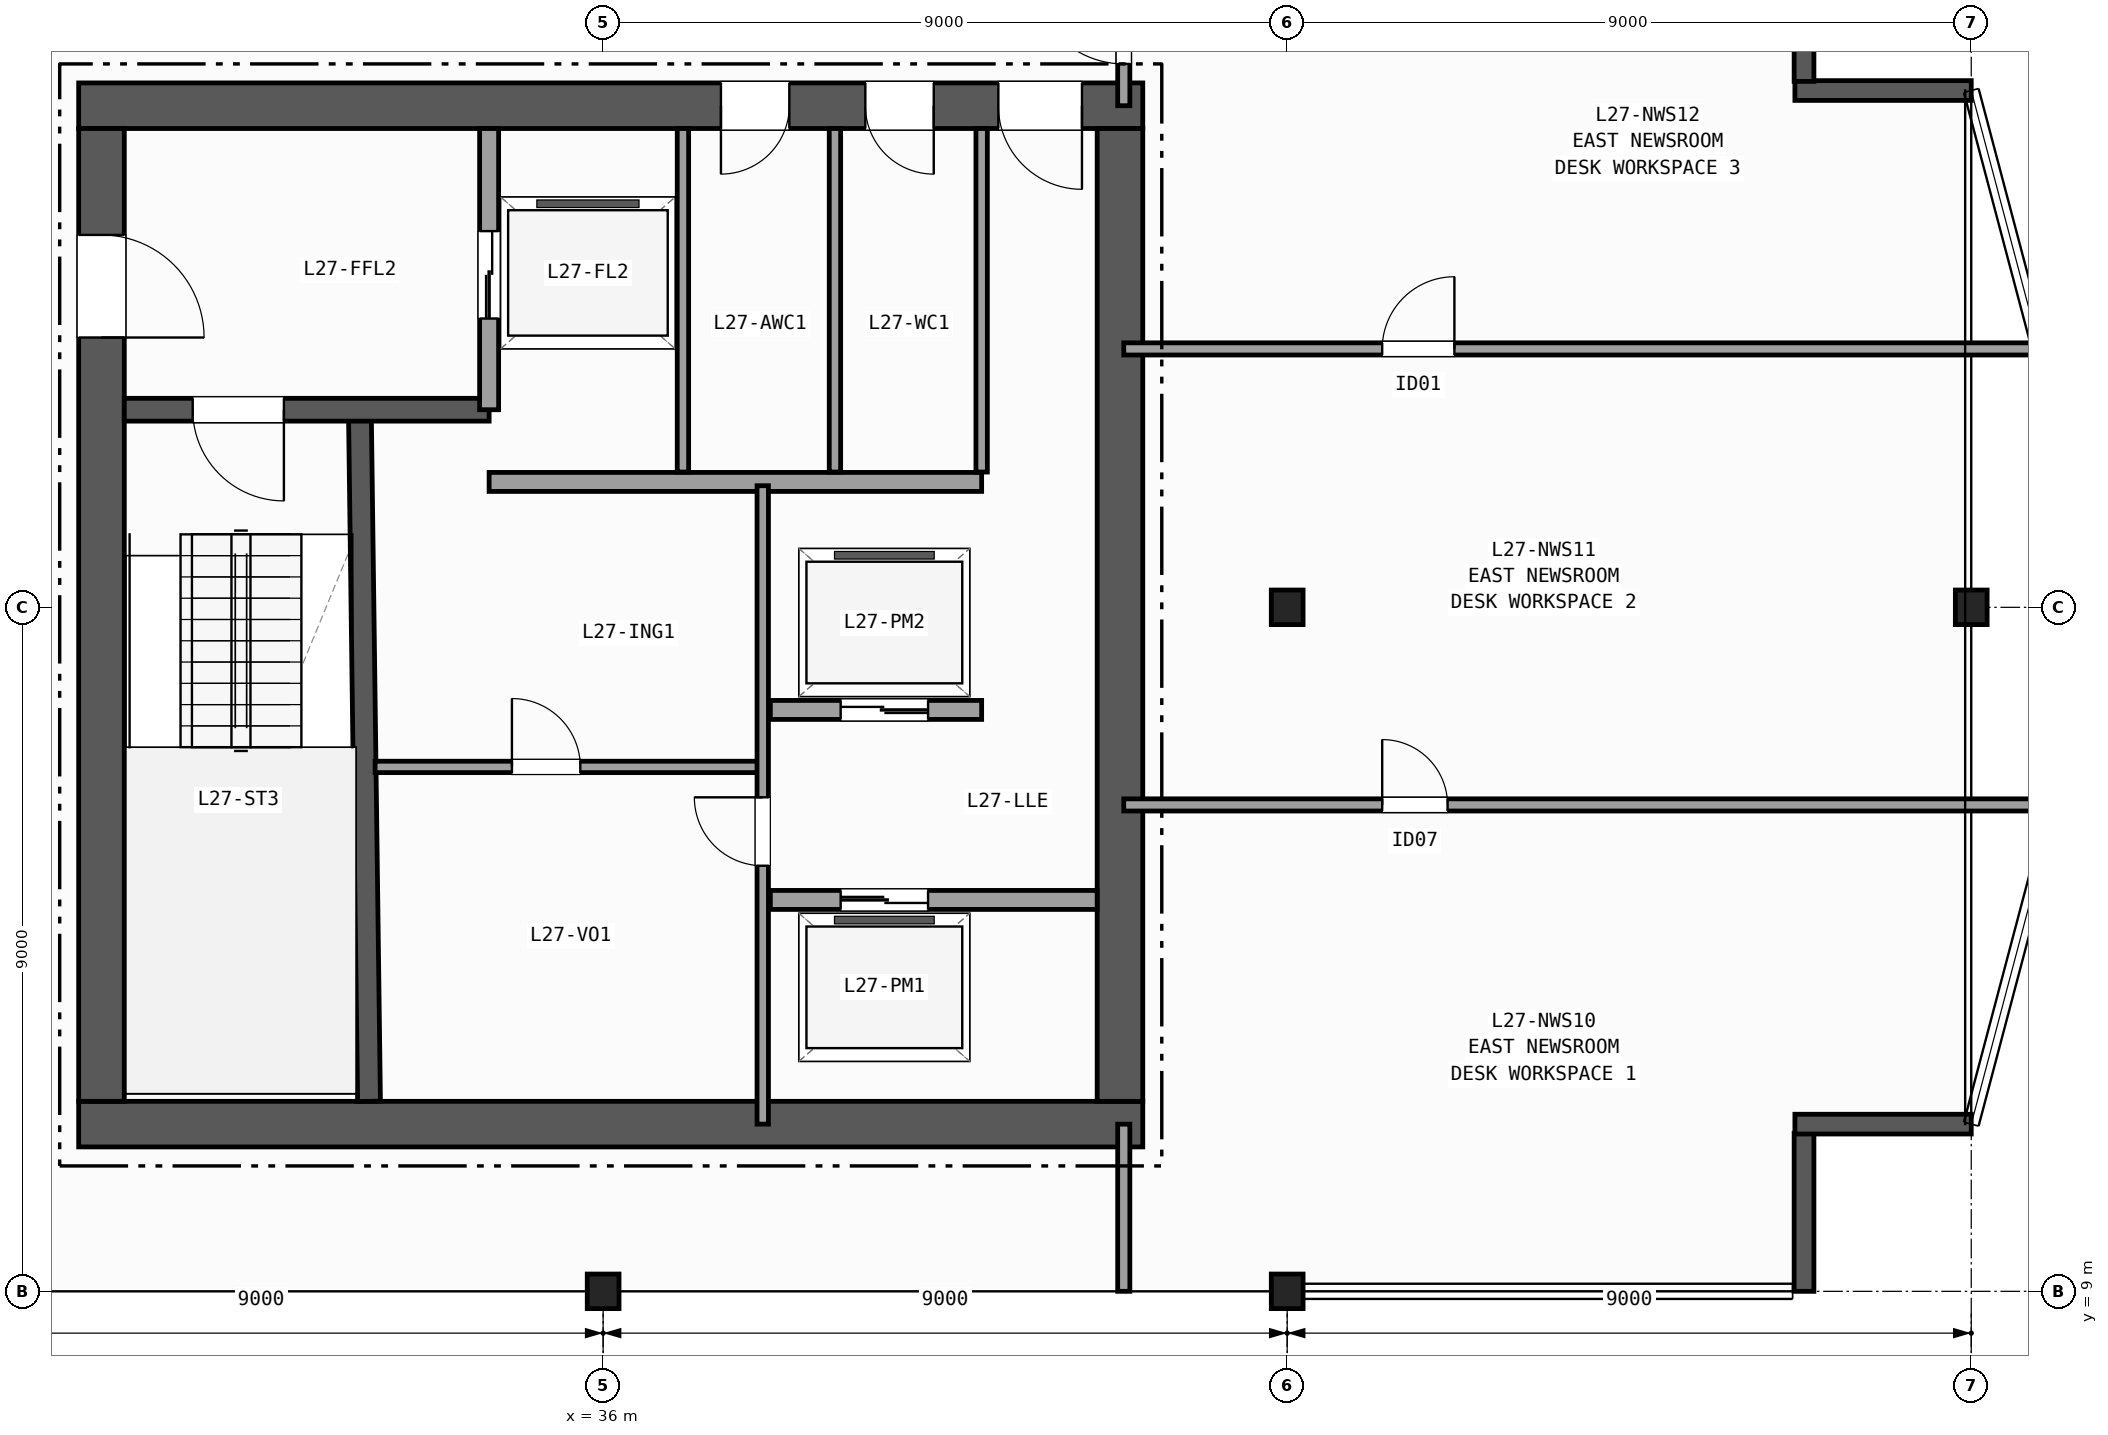
"""IFC4 building model, lengths in metres.
Left out: names, types, materials, properties, quantities, classifications, styles, units other than length and angle.
Written with IfcOpenShell. Run it as: python <this file> out.ifc"""

import sys

from ifc_helpers import new_model, si_unit, direction, frame, frame_2d, origin, origin_2d, place, context, subcontext, project, spatial, rectangle, i_section, extrude, element, fill, save


model = new_model("IFC4")
c1 = context("Model", 3, precision=1e-05, world=origin(), true_north=direction((0.0, 1.0)))
c2 = subcontext(c1, "Body", "Model", "MODEL_VIEW")
j1 = project(units=[si_unit("LENGTHUNIT", "METRE"), si_unit("PLANEANGLEUNIT", "RADIAN")], contexts=[c1])
p1 = place(None, origin())
s1 = spatial("IfcSite", under=j1, at=p1, CompositionType="ELEMENT")
p2 = place(p1, origin())
s2 = spatial("IfcBuilding", under=s1, at=p2, CompositionType="ELEMENT")
p3 = place(p2, frame((0.0, 0.0, 113.7)))
s3 = spatial("IfcBuildingStorey", under=s2, at=p3, CompositionType="ELEMENT", Elevation=113.7)
for number, where, z_axis, x_axis in (
    (1, (36.0, 9.0, 0.0), (0.0, 0.0, 1.0), (1.0, 0.0, 0.0)),
    (2, (45.0, 9.0, 0.0), (0.0, 0.0, 1.0), (1.0, 0.0, 0.0)),
    (3, (45.0, 18.0, 0.0), (0.0, 0.0, 1.0), (1.0, 0.0, 0.0)),
    (4, (54.0, 18.0, 0.0), (0.0, 0.0, 1.0), (1.0, 0.0, 0.0)),
):
    element("IfcColumn", number, at=place(p3, frame(where, z_axis=z_axis, x_axis=x_axis)), inside=s3, PredefinedType="COLUMN", context=c2, shape_type="SweptSolid", body=[
        extrude(i_section(OverallWidth=0.418, OverallDepth=0.455, WebThickness=0.042, FlangeThickness=0.068, FilletRadius=0.015, at=origin_2d()), origin(), (0.0, 0.0, 1.0), 3.7),
    ])
p4 = place(p3, frame((51.8, 9.0, 0.0), z_axis=(0.0, 0.0, 1.0), x_axis=(0.0, 1.0, 0.0)))
e5 = element("IfcWall", 5, at=p4, inside=s3, PredefinedType="SOLIDWALL", context=c2, shape_type="SweptSolid", body=[
    extrude(rectangle(XDim=2.08, YDim=0.26, at=frame_2d((1.04, 0.0))), origin(), (0.0, 0.0, 1.0), 3.42),
])
for number, where, z_axis, x_axis in (
    (6, (51.68, 11.2, 0.0), (0.0, 0.0, 1.0), (1.0, 0.0, 0.0)),
    (7, (54.0, 24.8, 0.0), (0.0, 0.0, 1.0), (-1.0, 0.0, 0.0)),
):
    element("IfcWall", number, at=place(p3, frame(where, z_axis=z_axis, x_axis=x_axis)), inside=s3, PredefinedType="SOLIDWALL", context=c2, shape_type="SweptSolid", body=[
        extrude(rectangle(XDim=2.32, YDim=0.26, at=frame_2d((1.16, 0.0))), origin(), (0.0, 0.0, 1.0), 3.42),
    ])
p5 = place(p3, frame((51.8, 24.92, 0.0), z_axis=(0.0, 0.0, 1.0), x_axis=(0.0, 1.0, 0.0)))
e8 = element("IfcWall", 8, at=p5, inside=s3, PredefinedType="SOLIDWALL", context=c2, shape_type="SweptSolid", body=[
    extrude(rectangle(XDim=2.08, YDim=0.26, at=frame_2d((1.04, 0.0))), origin(), (0.0, 0.0, 1.0), 3.42),
])
p6 = place(p3, frame((29.1, 11.2, 0.0), z_axis=(0.0, 0.0, 1.0), x_axis=(1.0, 0.0, 0.0)))
e9 = element("IfcWall", 9, at=p6, inside=s3, PredefinedType="SHEAR", context=c2, shape_type="SweptSolid", body=[
    extrude(rectangle(XDim=14.0, YDim=0.6, at=frame_2d((7.0, 0.0))), origin(), (0.0, 0.0, 1.0), 3.42),
])
p7 = place(p3, frame((43.1, 24.6, 0.0), z_axis=(0.0, 0.0, 1.0), x_axis=(-1.0, 0.0, 0.0)))
e10 = element("IfcWall", 10, at=p7, inside=s3, PredefinedType="SHEAR", context=c2, shape_type="SweptSolid", body=[
    extrude(rectangle(XDim=14.0, YDim=0.6, at=frame_2d((7.0, 0.0))), origin(), (0.0, 0.0, 1.0), 3.42),
])
p8 = place(p7, frame((0.8, 0.0, 0.0)))
e11 = element("IfcOpeningElement", 11, at=p8, cuts=e10, PredefinedType="OPENING", context=c2, shape_type="SweptSolid", body=[
    extrude(rectangle(XDim=1.1, YDim=2.15, at=frame_2d((0.55, 1.075))), frame((0.0, 0.31, 0.0), z_axis=(0.0, -1.0, 0.0), x_axis=(1.0, 0.0, 0.0)), (0.0, 0.0, 1.0), 0.62),
])
p9 = place(p7, frame((2.75, 0.0, 0.0)))
e12 = element("IfcOpeningElement", 12, at=p9, cuts=e10, PredefinedType="OPENING", context=c2, shape_type="SweptSolid", body=[
    extrude(rectangle(XDim=0.9, YDim=2.1, at=frame_2d((0.45, 1.05))), frame((0.0, 0.31, 0.0), z_axis=(0.0, -1.0, 0.0), x_axis=(1.0, 0.0, 0.0)), (0.0, 0.0, 1.0), 0.62),
])
p10 = place(p7, frame((4.65, 0.0, 0.0)))
e13 = element("IfcOpeningElement", 13, at=p10, cuts=e10, PredefinedType="OPENING", context=c2, shape_type="SweptSolid", body=[
    extrude(rectangle(XDim=0.9, YDim=2.1, at=frame_2d((0.45, 1.05))), frame((0.0, 0.31, 0.0), z_axis=(0.0, -1.0, 0.0), x_axis=(1.0, 0.0, 0.0)), (0.0, 0.0, 1.0), 0.62),
])
p11 = place(p3, frame((29.4, 24.3, 0.0), z_axis=(0.0, 0.0, 1.0), x_axis=(0.0, -1.0, 0.0)))
e14 = element("IfcWall", 14, at=p11, inside=s3, PredefinedType="SHEAR", context=c2, shape_type="SweptSolid", body=[
    extrude(rectangle(XDim=12.8, YDim=0.6, at=frame_2d((6.4, 0.0))), origin(), (0.0, 0.0, 1.0), 3.42),
])
p12 = place(p11, frame((1.4, 0.0, 0.0)))
e15 = element("IfcOpeningElement", 15, at=p12, cuts=e14, PredefinedType="OPENING", context=c2, shape_type="SweptSolid", body=[
    extrude(rectangle(XDim=1.35, YDim=2.15, at=frame_2d((0.675, 1.075))), frame((0.0, 0.31, 0.0), z_axis=(0.0, -1.0, 0.0), x_axis=(1.0, 0.0, 0.0)), (0.0, 0.0, 1.0), 0.62),
])
p13 = place(p3, frame((42.8, 11.5, 0.0), z_axis=(0.0, 0.0, 1.0), x_axis=(0.0, 1.0, 0.0)))
e16 = element("IfcWall", 16, at=p13, inside=s3, PredefinedType="SHEAR", context=c2, shape_type="SweptSolid", body=[
    extrude(rectangle(XDim=12.8, YDim=0.6, at=frame_2d((6.4, 0.0))), origin(), (0.0, 0.0, 1.0), 3.42),
])
p14 = place(p3, frame((32.92, 11.5, 0.0), z_axis=(0.0, 0.0, 1.0), x_axis=(-0.013244407292, 0.999912288991, 0.0)))
e17 = element("IfcWall", 17, at=p14, inside=s3, PredefinedType="SHEAR", context=c2, shape_type="SweptSolid", body=[
    extrude(rectangle(XDim=9.051, YDim=0.3, at=frame_2d((4.525, 0.0))), origin(), (0.0, 0.0, 1.0), 3.42),
])
p15 = place(p3, frame((34.5, 20.6, 0.0), z_axis=(0.0, 0.0, 1.0), x_axis=(-1.0, 0.0, 0.0)))
e18 = element("IfcWall", 18, at=p15, inside=s3, PredefinedType="SHEAR", context=c2, shape_type="SweptSolid", body=[
    extrude(rectangle(XDim=4.8, YDim=0.3, at=frame_2d((2.4, 0.0))), origin(), (0.0, 0.0, 1.0), 3.42),
])
p16 = place(p15, frame((2.7, 0.0, 0.0)))
e19 = element("IfcOpeningElement", 19, at=p16, cuts=e18, PredefinedType="OPENING", context=c2, shape_type="SweptSolid", body=[
    extrude(rectangle(XDim=1.2, YDim=2.15, at=frame_2d((0.6, 1.075))), frame((0.0, 0.16, 0.0), z_axis=(0.0, -1.0, 0.0), x_axis=(1.0, 0.0, 0.0)), (0.0, 0.0, 1.0), 0.32),
])
p17 = place(p3, frame((34.5, 20.6, 0.0), z_axis=(0.0, 0.0, 1.0), x_axis=(0.0, 1.0, 0.0)))
e20 = element("IfcWall", 20, at=p17, inside=s3, PredefinedType="PARTITIONING", context=c2, shape_type="SweptSolid", body=[
    extrude(rectangle(XDim=3.7, YDim=0.25, at=frame_2d((1.85, 0.0))), origin(), (0.0, 0.0, 1.0), 3.42),
])
p18 = place(p17, frame((1.2, 0.0, 0.0)))
e21 = element("IfcOpeningElement", 21, at=p18, cuts=e20, PredefinedType="OPENING", context=c2, shape_type="SweptSolid", body=[
    extrude(rectangle(XDim=1.15, YDim=2.15, at=frame_2d((0.575, 1.075))), frame((0.0, 0.135, 0.0), z_axis=(0.0, -1.0, 0.0), x_axis=(1.0, 0.0, 0.0)), (0.0, 0.0, 1.0), 0.27),
])
p19 = place(p3, frame((34.5, 19.65, 0.0), z_axis=(0.0, 0.0, 1.0), x_axis=(1.0, 0.0, 0.0)))
e22 = element("IfcWall", 22, at=p19, inside=s3, PredefinedType="PARTITIONING", context=c2, shape_type="SweptSolid", body=[
    extrude(rectangle(XDim=6.48, YDim=0.25, at=frame_2d((3.24, 0.0))), origin(), (0.0, 0.0, 1.0), 3.42),
])
p20 = place(p3, frame((38.2, 14.15, 0.0), z_axis=(0.0, 0.0, 1.0), x_axis=(1.0, 0.0, 0.0)))
e23 = element("IfcWall", 23, at=p20, inside=s3, PredefinedType="PARTITIONING", context=c2, shape_type="SweptSolid", body=[
    extrude(rectangle(XDim=4.3, YDim=0.25, at=frame_2d((2.15, 0.0))), origin(), (0.0, 0.0, 1.0), 3.42),
])
p21 = place(p20, frame((0.925, 0.0, 0.0)))
e24 = element("IfcOpeningElement", 24, at=p21, cuts=e23, PredefinedType="OPENING", context=c2, shape_type="SweptSolid", body=[
    extrude(rectangle(XDim=1.15, YDim=2.15, at=frame_2d((0.575, 1.075))), frame((0.0, 0.135, 0.0), z_axis=(0.0, -1.0, 0.0), x_axis=(1.0, 0.0, 0.0)), (0.0, 0.0, 1.0), 0.27),
])
p22 = place(p3, frame((40.98, 16.65, 0.0), z_axis=(0.0, 0.0, 1.0), x_axis=(-1.0, 0.0, 0.0)))
e25 = element("IfcWall", 25, at=p22, inside=s3, PredefinedType="PARTITIONING", context=c2, shape_type="SweptSolid", body=[
    extrude(rectangle(XDim=2.78, YDim=0.25, at=frame_2d((1.39, 0.0))), origin(), (0.0, 0.0, 1.0), 3.42),
])
p23 = place(p22, frame((0.705, 0.0, 0.0)))
e26 = element("IfcOpeningElement", 26, at=p23, cuts=e25, PredefinedType="OPENING", context=c2, shape_type="SweptSolid", body=[
    extrude(rectangle(XDim=1.15, YDim=2.15, at=frame_2d((0.575, 1.075))), frame((0.0, 0.135, 0.0), z_axis=(0.0, -1.0, 0.0), x_axis=(1.0, 0.0, 0.0)), (0.0, 0.0, 1.0), 0.27),
])
p24 = place(p3, frame((33.0, 15.9, 0.0), z_axis=(0.0, 0.0, 1.0), x_axis=(1.0, 0.0, 0.0)))
e27 = element("IfcWall", 27, at=p24, inside=s3, PredefinedType="PARTITIONING", context=c2, shape_type="SweptSolid", body=[
    extrude(rectangle(XDim=5.1, YDim=0.15, at=frame_2d((2.55, 0.0))), origin(), (0.0, 0.0, 1.0), 3.42),
])
p25 = place(p24, frame((1.8, 0.0, 0.0)))
e28 = element("IfcOpeningElement", 28, at=p25, cuts=e27, PredefinedType="OPENING", context=c2, shape_type="SweptSolid", body=[
    extrude(rectangle(XDim=0.9, YDim=2.1, at=frame_2d((0.45, 1.05))), frame((0.0, 0.085, 0.0), z_axis=(0.0, -1.0, 0.0), x_axis=(1.0, 0.0, 0.0)), (0.0, 0.0, 1.0), 0.17),
])
p26 = place(p3, frame((38.1, 11.2, 0.0), z_axis=(0.0, 0.0, 1.0), x_axis=(0.0, 1.0, 0.0)))
e29 = element("IfcWall", 29, at=p26, inside=s3, PredefinedType="PARTITIONING", context=c2, shape_type="SweptSolid", body=[
    extrude(rectangle(XDim=8.4, YDim=0.15, at=frame_2d((4.2, 0.0))), origin(), (0.0, 0.0, 1.0), 3.42),
])
p27 = place(p26, frame((3.4, 0.0, 0.0)))
e30 = element("IfcOpeningElement", 30, at=p27, cuts=e29, PredefinedType="OPENING", context=c2, shape_type="SweptSolid", body=[
    extrude(rectangle(XDim=0.9, YDim=2.1, at=frame_2d((0.45, 1.05))), frame((0.0, 0.085, 0.0), z_axis=(0.0, -1.0, 0.0), x_axis=(1.0, 0.0, 0.0)), (0.0, 0.0, 1.0), 0.17),
])
for number, where, z_axis, x_axis in (
    (31, (37.05, 19.78, 0.0), (0.0, 0.0, 1.0), (0.0, 1.0, 0.0)),
    (32, (39.05, 19.78, 0.0), (0.0, 0.0, 1.0), (0.0, 1.0, 0.0)),
    (33, (40.98, 19.78, 0.0), (0.0, 0.0, 1.0), (0.0, 1.0, 0.0)),
):
    element("IfcWall", number, at=place(p3, frame(where, z_axis=z_axis, x_axis=x_axis)), inside=s3, PredefinedType="PARTITIONING", context=c2, shape_type="SweptSolid", body=[
        extrude(rectangle(XDim=4.52, YDim=0.15, at=frame_2d((2.26, 0.0))), origin(), (0.0, 0.0, 1.0), 3.42),
    ])
p28 = place(p3, frame((42.85, 9.0, 0.0), z_axis=(0.0, 0.0, 1.0), x_axis=(0.0, 1.0, 0.0)))
e34 = element("IfcWall", 34, at=p28, inside=s3, PredefinedType="PARTITIONING", context=c2, shape_type="SweptSolid", body=[
    extrude(rectangle(XDim=2.2, YDim=0.16, at=frame_2d((1.1, 0.0))), origin(), (0.0, 0.0, 1.0), 2.634),
])
p29 = place(p3, frame((42.85, 24.6, 0.0), z_axis=(0.0, 0.0, 1.0), x_axis=(0.0, 1.0, 0.0)))
e35 = element("IfcWall", 35, at=p29, inside=s3, PredefinedType="PARTITIONING", context=c2, shape_type="SweptSolid", body=[
    extrude(rectangle(XDim=2.4, YDim=0.16, at=frame_2d((1.2, 0.0))), origin(), (0.0, 0.0, 1.0), 2.634),
])
p30 = place(p29, frame((0.55, 0.0, 0.0)))
e36 = element("IfcOpeningElement", 36, at=p30, cuts=e35, PredefinedType="OPENING", context=c2, shape_type="SweptSolid", body=[
    extrude(rectangle(XDim=1.2, YDim=2.15, at=frame_2d((0.6, 1.075))), frame((0.0, 0.09, 0.0), z_axis=(0.0, -1.0, 0.0), x_axis=(1.0, 0.0, 0.0)), (0.0, 0.0, 1.0), 0.18),
])
p31 = place(p3, frame((42.85, 15.4, 0.0), z_axis=(0.0, 0.0, 1.0), x_axis=(1.0, 0.0, 0.0)))
e37 = element("IfcWall", 37, at=p31, inside=s3, PredefinedType="PARTITIONING", context=c2, shape_type="SweptSolid", body=[
    extrude(rectangle(XDim=12.262, YDim=0.16, at=frame_2d((6.131, 0.0))), origin(), (0.0, 0.0, 1.0), 3.42),
])
p32 = place(p31, frame((3.4, 0.0, 0.0)))
e38 = element("IfcOpeningElement", 38, at=p32, cuts=e37, PredefinedType="OPENING", context=c2, shape_type="SweptSolid", body=[
    extrude(rectangle(XDim=0.86, YDim=2.05, at=frame_2d((0.43, 1.025))), frame((0.0, 0.09, 0.0), z_axis=(0.0, -1.0, 0.0), x_axis=(1.0, 0.0, 0.0)), (0.0, 0.0, 1.0), 0.18),
])
p33 = place(p3, frame((42.85, 21.4, 0.0), z_axis=(0.0, 0.0, 1.0), x_axis=(1.0, 0.0, 0.0)))
e39 = element("IfcWall", 39, at=p33, inside=s3, PredefinedType="PARTITIONING", context=c2, shape_type="SweptSolid", body=[
    extrude(rectangle(XDim=12.05, YDim=0.16, at=frame_2d((6.025, 0.0))), origin(), (0.0, 0.0, 1.0), 3.42),
])
p34 = place(p33, frame((3.4, 0.0, 0.0)))
e40 = element("IfcOpeningElement", 40, at=p34, cuts=e39, PredefinedType="OPENING", context=c2, shape_type="SweptSolid", body=[
    extrude(rectangle(XDim=0.95, YDim=2.1, at=frame_2d((0.475, 1.05))), frame((0.0, 0.09, 0.0), z_axis=(0.0, -1.0, 0.0), x_axis=(1.0, 0.0, 0.0)), (0.0, 0.0, 1.0), 0.18),
])
p35 = place(p16, origin())
e41 = element("IfcDoor", 41, at=p35, inside=s3, OperationType="SINGLE_SWING_LEFT", PredefinedType="DOOR", context=c2, shape_type="SweptSolid", body=[
    extrude(rectangle(XDim=1.2, YDim=2.15, at=frame_2d((0.6, 1.075))), frame((0.0, 0.025, 0.0), z_axis=(0.0, -1.0, 0.0), x_axis=(1.0, 0.0, 0.0)), (0.0, 0.0, 1.0), 0.05),
])
fill(e19, e41)
p36 = place(p12, origin())
e42 = element("IfcDoor", 42, at=p36, inside=s3, OperationType="SINGLE_SWING_RIGHT", PredefinedType="DOOR", context=c2, shape_type="SweptSolid", body=[
    extrude(rectangle(XDim=1.35, YDim=2.15, at=frame_2d((0.675, 1.075))), frame((0.0, 0.025, 0.0), z_axis=(0.0, -1.0, 0.0), x_axis=(1.0, 0.0, 0.0)), (0.0, 0.0, 1.0), 0.05),
])
fill(e15, e42)
p37 = place(p8, origin())
e43 = element("IfcDoor", 43, at=p37, inside=s3, OperationType="SINGLE_SWING_LEFT", PredefinedType="DOOR", context=c2, shape_type="SweptSolid", body=[
    extrude(rectangle(XDim=1.1, YDim=2.15, at=frame_2d((0.55, 1.075))), frame((0.0, 0.025, 0.0), z_axis=(0.0, -1.0, 0.0), x_axis=(1.0, 0.0, 0.0)), (0.0, 0.0, 1.0), 0.05),
])
fill(e11, e43)
p38 = place(p9, origin())
e44 = element("IfcDoor", 44, at=p38, inside=s3, OperationType="SINGLE_SWING_LEFT", PredefinedType="DOOR", context=c2, shape_type="SweptSolid", body=[
    extrude(rectangle(XDim=0.9, YDim=2.1, at=frame_2d((0.45, 1.05))), frame((0.0, 0.025, 0.0), z_axis=(0.0, -1.0, 0.0), x_axis=(1.0, 0.0, 0.0)), (0.0, 0.0, 1.0), 0.05),
])
fill(e12, e44)
p39 = place(p10, origin())
e45 = element("IfcDoor", 45, at=p39, inside=s3, OperationType="SINGLE_SWING_RIGHT", PredefinedType="DOOR", context=c2, shape_type="SweptSolid", body=[
    extrude(rectangle(XDim=0.9, YDim=2.1, at=frame_2d((0.45, 1.05))), frame((0.0, 0.025, 0.0), z_axis=(0.0, -1.0, 0.0), x_axis=(1.0, 0.0, 0.0)), (0.0, 0.0, 1.0), 0.05),
])
fill(e13, e45)
p40 = place(p18, origin())
e46 = element("IfcDoor", 46, at=p40, inside=s3, OperationType="DOUBLE_DOOR_SLIDING", PredefinedType="DOOR", context=c2, shape_type="SweptSolid", body=[
    extrude(rectangle(XDim=1.15, YDim=2.15, at=frame_2d((0.575, 1.075))), frame((0.0, 0.025, 0.0), z_axis=(0.0, -1.0, 0.0), x_axis=(1.0, 0.0, 0.0)), (0.0, 0.0, 1.0), 0.05),
])
fill(e21, e46)
p41 = place(p21, origin())
e47 = element("IfcDoor", 47, at=p41, inside=s3, OperationType="DOUBLE_DOOR_SLIDING", PredefinedType="DOOR", context=c2, shape_type="SweptSolid", body=[
    extrude(rectangle(XDim=1.15, YDim=2.15, at=frame_2d((0.575, 1.075))), frame((0.0, 0.025, 0.0), z_axis=(0.0, -1.0, 0.0), x_axis=(1.0, 0.0, 0.0)), (0.0, 0.0, 1.0), 0.05),
])
fill(e24, e47)
p42 = place(p23, origin())
e48 = element("IfcDoor", 48, at=p42, inside=s3, OperationType="DOUBLE_DOOR_SLIDING", PredefinedType="DOOR", context=c2, shape_type="SweptSolid", body=[
    extrude(rectangle(XDim=1.15, YDim=2.15, at=frame_2d((0.575, 1.075))), frame((0.0, 0.025, 0.0), z_axis=(0.0, -1.0, 0.0), x_axis=(1.0, 0.0, 0.0)), (0.0, 0.0, 1.0), 0.05),
])
fill(e26, e48)
p43 = place(p27, origin())
e49 = element("IfcDoor", 49, at=p43, inside=s3, OperationType="SINGLE_SWING_RIGHT", PredefinedType="DOOR", context=c2, shape_type="SweptSolid", body=[
    extrude(rectangle(XDim=0.9, YDim=2.1, at=frame_2d((0.45, 1.05))), frame((0.0, 0.025, 0.0), z_axis=(0.0, -1.0, 0.0), x_axis=(1.0, 0.0, 0.0)), (0.0, 0.0, 1.0), 0.05),
])
fill(e30, e49)
p44 = place(p25, origin())
e50 = element("IfcDoor", 50, at=p44, inside=s3, OperationType="SINGLE_SWING_LEFT", PredefinedType="DOOR", context=c2, shape_type="SweptSolid", body=[
    extrude(rectangle(XDim=0.9, YDim=2.1, at=frame_2d((0.45, 1.05))), frame((0.0, 0.025, 0.0), z_axis=(0.0, -1.0, 0.0), x_axis=(1.0, 0.0, 0.0)), (0.0, 0.0, 1.0), 0.05),
])
fill(e28, e50)
p45 = place(p30, origin())
e51 = element("IfcDoor", 51, at=p45, inside=s3, OperationType="SINGLE_SWING_RIGHT", PredefinedType="DOOR", context=c2, shape_type="SweptSolid", body=[
    extrude(rectangle(XDim=1.2, YDim=2.15, at=frame_2d((0.6, 1.075))), frame((0.0, 0.025, 0.0), z_axis=(0.0, -1.0, 0.0), x_axis=(1.0, 0.0, 0.0)), (0.0, 0.0, 1.0), 0.05),
])
fill(e36, e51)
p46 = place(p32, origin())
e52 = element("IfcDoor", 52, at=p46, inside=s3, OperationType="SINGLE_SWING_LEFT", PredefinedType="DOOR", context=c2, shape_type="SweptSolid", body=[
    extrude(rectangle(XDim=0.86, YDim=2.05, at=frame_2d((0.43, 1.025))), frame((0.0, 0.025, 0.0), z_axis=(0.0, -1.0, 0.0), x_axis=(1.0, 0.0, 0.0)), (0.0, 0.0, 1.0), 0.05),
])
fill(e38, e52)
p47 = place(p34, origin())
e53 = element("IfcDoor", 53, at=p47, inside=s3, OperationType="SINGLE_SWING_RIGHT", PredefinedType="DOOR", context=c2, shape_type="SweptSolid", body=[
    extrude(rectangle(XDim=0.95, YDim=2.1, at=frame_2d((0.475, 1.05))), frame((0.0, 0.025, 0.0), z_axis=(0.0, -1.0, 0.0), x_axis=(1.0, 0.0, 0.0)), (0.0, 0.0, 1.0), 0.05),
])
fill(e40, e53)
save(model, sys.argv[1])
